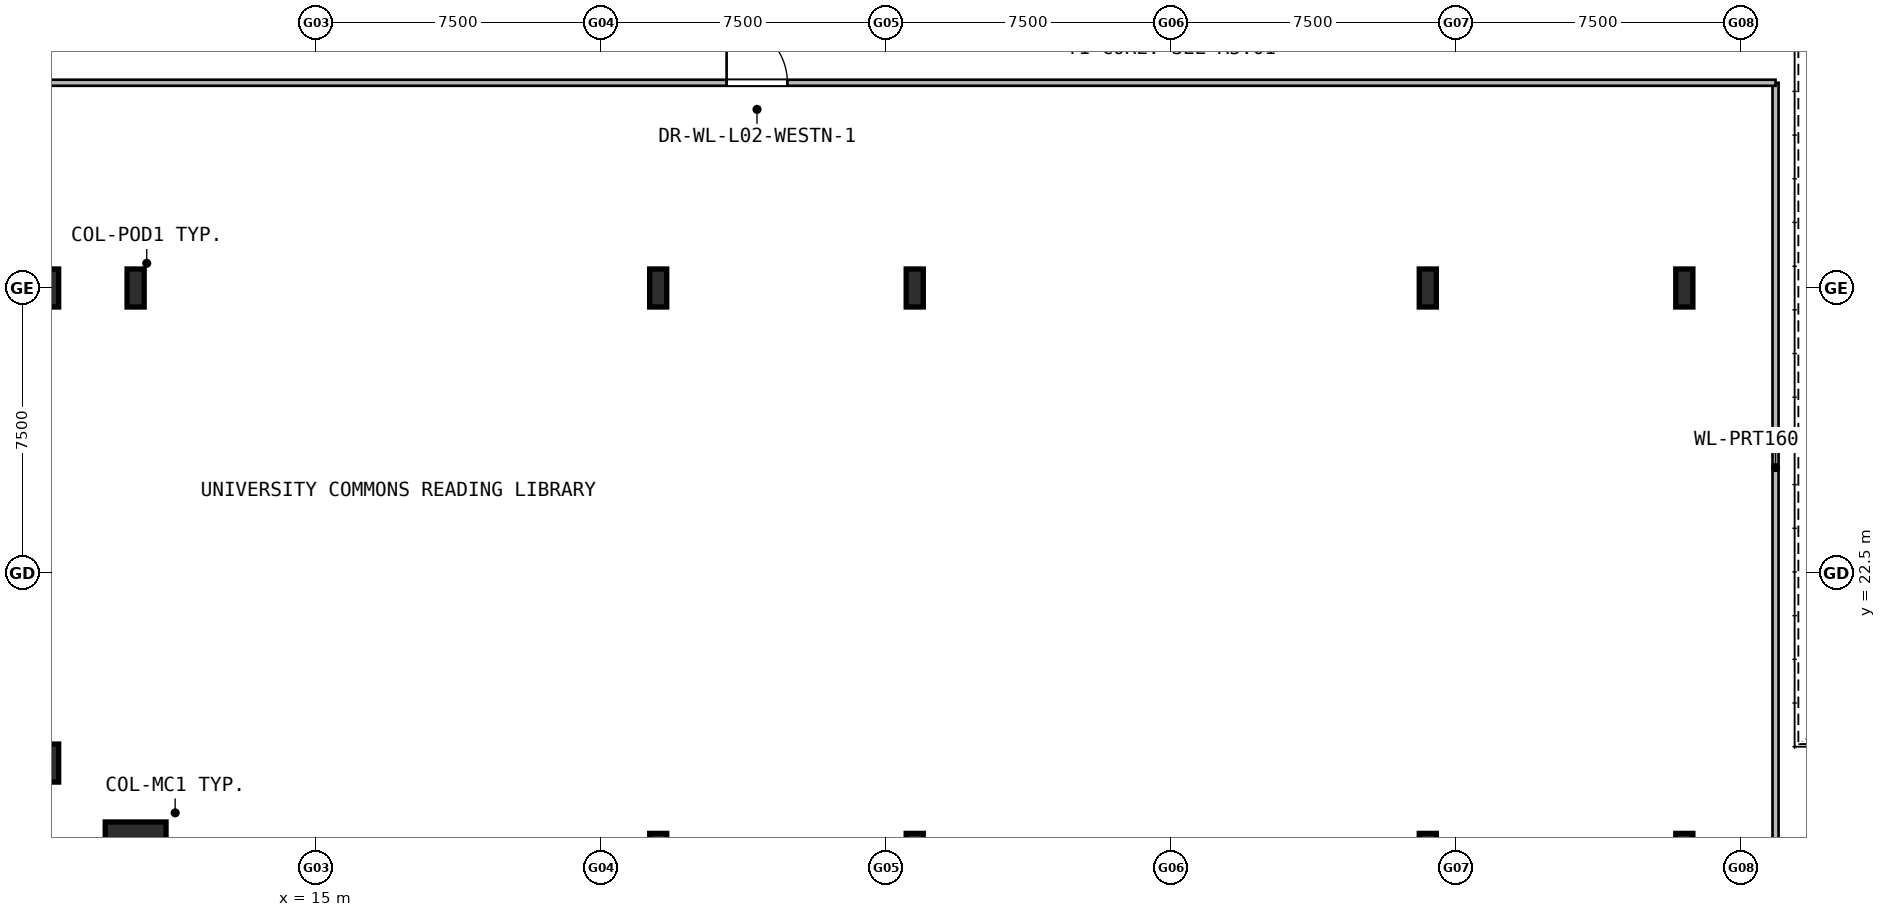
"""IFC4 building model, lengths in metres.
Left out: names, types, materials, properties, quantities, classifications, styles, units other than length and angle.
Written with IfcOpenShell. Run it as: python <this file> out.ifc"""

import sys

from ifc_helpers import new_model, si_unit, direction, frame, frame_2d, origin, origin_2d, place, context, subcontext, project, spatial, rectangle, hollow_rectangle, i_section, extrude, element, fill, save


model = new_model("IFC4")
c1 = context("Model", 3, precision=1e-05, world=origin(), true_north=direction((0.0, 1.0)))
c2 = subcontext(c1, "Body", "Model", "MODEL_VIEW")
j1 = project(units=[si_unit("LENGTHUNIT", "METRE"), si_unit("PLANEANGLEUNIT", "RADIAN")], contexts=[c1])
p1 = place(None, origin())
s1 = spatial("IfcSite", under=j1, at=p1, CompositionType="ELEMENT")
p2 = place(p1, origin())
s2 = spatial("IfcBuilding", under=s1, at=p2, CompositionType="ELEMENT")
p3 = place(p2, frame((0.0, 0.0, 10.8)))
s3 = spatial("IfcBuildingStorey", under=s2, at=p3, CompositionType="ELEMENT", Elevation=10.8)
p4 = place(p3, frame((10.25, 15.15, 0.0), z_axis=(0.0, 0.0, 1.0), x_axis=(1.0, 0.0, 0.0)))
e1 = element("IfcColumn", 1, at=p4, inside=s3, PredefinedType="COLUMN", context=c2, shape_type="SweptSolid", body=[
    extrude(hollow_rectangle(XDim=1.6, YDim=1.6, WallThickness=0.04, at=origin_2d()), origin(), (0.0, 0.0, 1.0), 4.8),
])
for number, where, z_axis, x_axis in (
    (2, (10.25, 30.0, 0.0), (0.0, 0.0, 1.0), (1.0, 0.0, 0.0)),
    (3, (24.0, 15.15, 0.0), (0.0, 0.0, 1.0), (1.0, 0.0, 0.0)),
    (4, (24.0, 30.0, 0.0), (0.0, 0.0, 1.0), (1.0, 0.0, 0.0)),
    (5, (30.75, 15.15, 0.0), (0.0, 0.0, 1.0), (1.0, 0.0, 0.0)),
    (6, (30.75, 30.0, 0.0), (0.0, 0.0, 1.0), (1.0, 0.0, 0.0)),
    (7, (44.25, 15.15, 0.0), (0.0, 0.0, 1.0), (1.0, 0.0, 0.0)),
    (8, (44.25, 30.0, 0.0), (0.0, 0.0, 1.0), (1.0, 0.0, 0.0)),
    (9, (51.0, 15.15, 0.0), (0.0, 0.0, 1.0), (1.0, 0.0, 0.0)),
    (10, (51.0, 30.0, 0.0), (0.0, 0.0, 1.0), (1.0, 0.0, 0.0)),
    (11, (8.0, 17.5, 0.0), (0.0, 0.0, 1.0), (1.0, 0.0, 0.0)),
    (12, (8.0, 30.0, 0.0), (0.0, 0.0, 1.0), (1.0, 0.0, 0.0)),
):
    element("IfcColumn", number, at=place(p3, frame(where, z_axis=z_axis, x_axis=x_axis)), inside=s3, PredefinedType="COLUMN", context=c2, shape_type="SweptSolid", body=[
        extrude(i_section(OverallWidth=0.45, OverallDepth=1.0, WebThickness=0.022, FlangeThickness=0.04, at=origin_2d()), origin(), (0.0, 0.0, 1.0), 4.8),
    ])
p5 = place(p3, frame((53.4, 15.15, 0.0), z_axis=(0.0, 0.0, 1.0), x_axis=(0.0, 1.0, 0.0)))
e13 = element("IfcWall", 13, at=p5, inside=s3, PredefinedType="PARTITIONING", context=c2, shape_type="SweptSolid", body=[
    extrude(rectangle(XDim=20.25, YDim=0.16, at=frame_2d((10.125, 0.0))), origin(), (0.0, 0.0, 1.0), 4.48),
])
p6 = place(p3, frame((7.65, 35.4, 0.0), z_axis=(0.0, 0.0, 1.0), x_axis=(1.0, 0.0, 0.0)))
e14 = element("IfcWall", 14, at=p6, inside=s3, PredefinedType="PARTITIONING", context=c2, shape_type="SweptSolid", body=[
    extrude(rectangle(XDim=45.75, YDim=0.16, at=frame_2d((22.875, 0.0))), origin(), (0.0, 0.0, 1.0), 4.48),
])
p7 = place(p6, frame((18.15, 0.0, 0.0)))
e15 = element("IfcOpeningElement", 15, at=p7, cuts=e14, PredefinedType="OPENING", context=c2, shape_type="SweptSolid", body=[
    extrude(rectangle(XDim=1.6, YDim=2.2, at=frame_2d((0.8, 1.1))), frame((0.0, 0.09, 0.0), z_axis=(0.0, -1.0, 0.0), x_axis=(1.0, 0.0, 0.0)), (0.0, 0.0, 1.0), 0.18),
])
p8 = place(p7, origin())
e16 = element("IfcDoor", 16, at=p8, inside=s3, OperationType="DOUBLE_DOOR_SINGLE_SWING", PredefinedType="DOOR", context=c2, shape_type="SweptSolid", body=[
    extrude(rectangle(XDim=1.6, YDim=2.2, at=frame_2d((0.8, 1.1))), frame((0.0, 0.025, 0.0), z_axis=(0.0, -1.0, 0.0), x_axis=(1.0, 0.0, 0.0)), (0.0, 0.0, 1.0), 0.05),
])
fill(e15, e16)
save(model, sys.argv[1])
